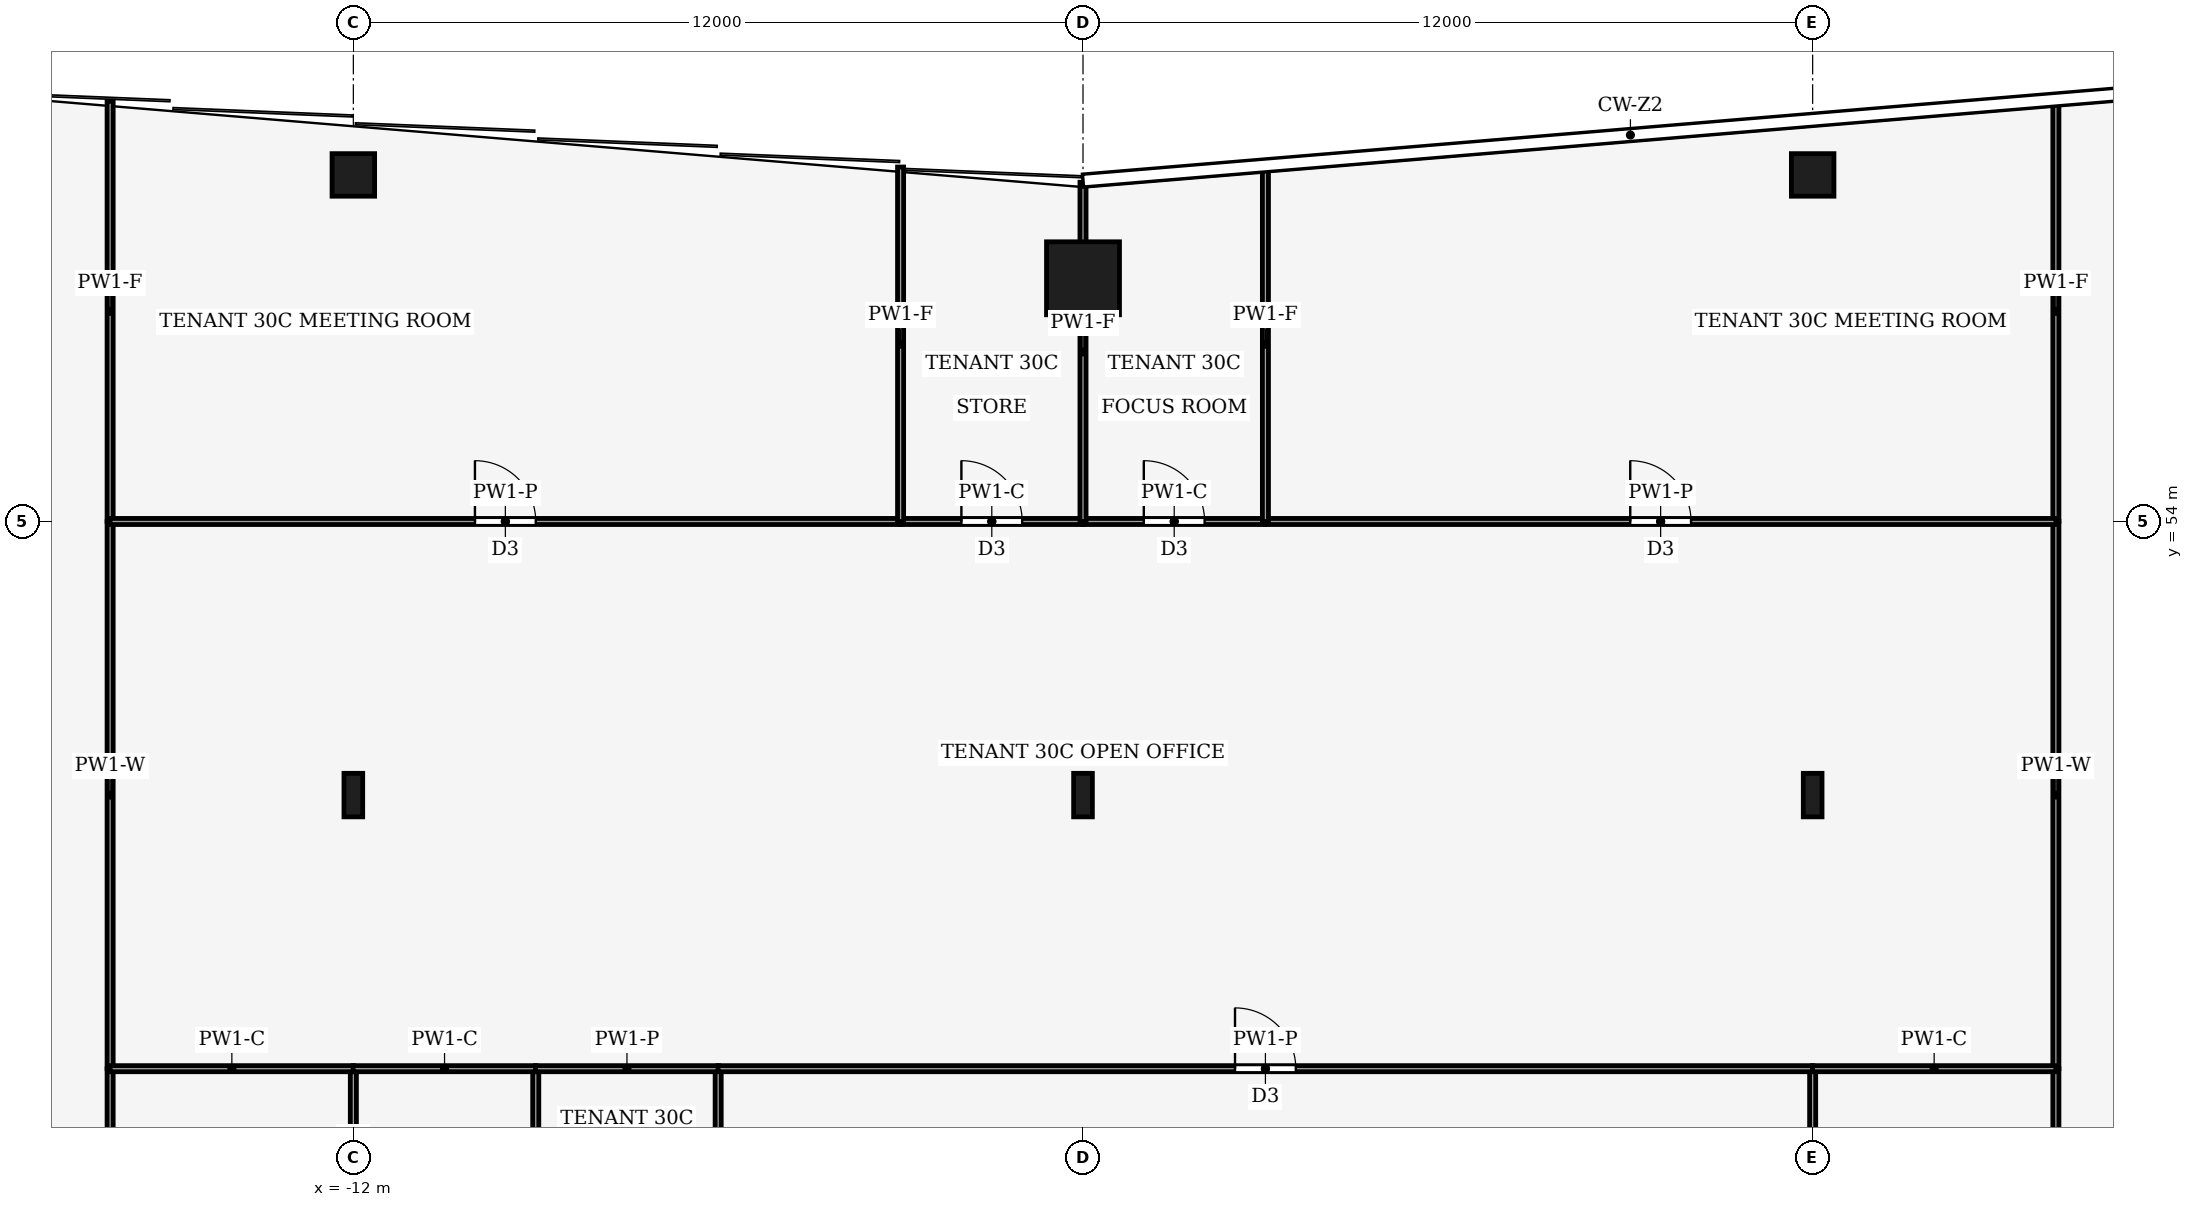
"""IFC4 building model, lengths in metres.
Left out: names, types, materials, properties, quantities, classifications, styles, units other than length and angle.
Written with IfcOpenShell. Run it as: python <this file> out.ifc"""

import sys

from ifc_helpers import new_model, si_unit, direction, frame, frame_2d, origin, origin_2d, place, context, subcontext, project, spatial, rectangle, hollow_rectangle, i_section, extrude, element, fill, save


model = new_model("IFC4")
c1 = context("Model", 3, precision=1e-05, world=origin(), true_north=direction((0.0, 1.0)))
c2 = subcontext(c1, "Body", "Model", "MODEL_VIEW")
j1 = project(units=[si_unit("LENGTHUNIT", "METRE"), si_unit("PLANEANGLEUNIT", "RADIAN")], contexts=[c1])
p1 = place(None, origin())
s1 = spatial("IfcSite", under=j1, at=p1, CompositionType="ELEMENT")
p2 = place(p1, origin())
s2 = spatial("IfcBuilding", under=s1, at=p2, CompositionType="ELEMENT")
p3 = place(p2, frame((0.0, 0.0, 134.0)))
s3 = spatial("IfcBuildingStorey", under=s2, at=p3, CompositionType="ELEMENT", Elevation=134.0)
p4 = place(p3, frame((0.0, 58.0, 0.0), z_axis=(0.0, 0.0, 1.0), x_axis=(1.0, 0.0, 0.0)))
e1 = element("IfcColumn", 1, at=p4, inside=s3, PredefinedType="COLUMN", context=c2, shape_type="SweptSolid", body=[
    extrude(hollow_rectangle(XDim=1.2, YDim=1.2, WallThickness=0.07, at=origin_2d()), origin(), (0.0, 0.0, 1.0), 4.0),
])
for number, where, z_axis, x_axis in (
    (2, (-12.0, 59.7, 0.0), (0.0, 0.0, 1.0), (1.0, 0.0, 0.0)),
    (3, (12.0, 59.7, 0.0), (0.0, 0.0, 1.0), (1.0, 0.0, 0.0)),
):
    element("IfcColumn", number, at=place(p3, frame(where, z_axis=z_axis, x_axis=x_axis)), inside=s3, PredefinedType="COLUMN", context=c2, shape_type="SweptSolid", body=[
        extrude(hollow_rectangle(XDim=0.7, YDim=0.7, WallThickness=0.03, at=origin_2d()), origin(), (0.0, 0.0, 1.0), 4.0),
    ])
for number, where, z_axis, x_axis in (
    (4, (-12.0, 49.5, 0.0), (0.0, 0.0, 1.0), (1.0, 0.0, 0.0)),
    (5, (0.0, 49.5, 0.0), (0.0, 0.0, 1.0), (1.0, 0.0, 0.0)),
    (6, (12.0, 49.5, 0.0), (0.0, 0.0, 1.0), (1.0, 0.0, 0.0)),
):
    element("IfcColumn", number, at=place(p3, frame(where, z_axis=z_axis, x_axis=x_axis)), inside=s3, PredefinedType="COLUMN", context=c2, shape_type="SweptSolid", body=[
        extrude(i_section(OverallWidth=0.308, OverallDepth=0.716, WebThickness=0.021, FlangeThickness=0.04, FilletRadius=0.027, at=origin_2d()), origin(), (0.0, 0.0, 1.0), 4.0),
    ])
p5 = place(p3, frame((-16.0, 41.0, 0.0), z_axis=(0.0, 0.0, 1.0), x_axis=(0.0, 1.0, 0.0)))
e7 = element("IfcWall", 7, at=p5, inside=s3, PredefinedType="PARTITIONING", context=c2, shape_type="SweptSolid", body=[
    extrude(rectangle(XDim=4.0, YDim=0.1, at=frame_2d((2.0, 0.0))), origin(), (0.0, 0.0, 1.0), 3.44),
])
p6 = place(p3, frame((-16.0, 45.0, 0.0), z_axis=(0.0, 0.0, 1.0), x_axis=(0.0, 1.0, 0.0)))
e8 = element("IfcWall", 8, at=p6, inside=s3, PredefinedType="PARTITIONING", context=c2, shape_type="SweptSolid", body=[
    extrude(rectangle(XDim=9.0, YDim=0.1, at=frame_2d((4.5, 0.0))), origin(), (0.0, 0.0, 1.0), 3.24),
])
p7 = place(p3, frame((-16.0, 54.0, 0.0), z_axis=(0.0, 0.0, 1.0), x_axis=(0.0, 1.0, 0.0)))
e9 = element("IfcWall", 9, at=p7, inside=s3, PredefinedType="PARTITIONING", context=c2, shape_type="SweptSolid", body=[
    extrude(rectangle(XDim=6.913, YDim=0.1, at=frame_2d((3.457, 0.0))), origin(), (0.0, 0.0, 1.0), 3.04),
])
p8 = place(p3, frame((16.0, 45.0, 0.0), z_axis=(0.0, 0.0, 1.0), x_axis=(0.0, -1.0, 0.0)))
e10 = element("IfcWall", 10, at=p8, inside=s3, PredefinedType="PARTITIONING", context=c2, shape_type="SweptSolid", body=[
    extrude(rectangle(XDim=4.0, YDim=0.1, at=frame_2d((2.0, 0.0))), origin(), (0.0, 0.0, 1.0), 3.44),
])
p9 = place(p3, frame((16.0, 54.0, 0.0), z_axis=(0.0, 0.0, 1.0), x_axis=(0.0, -1.0, 0.0)))
e11 = element("IfcWall", 11, at=p9, inside=s3, PredefinedType="PARTITIONING", context=c2, shape_type="SweptSolid", body=[
    extrude(rectangle(XDim=9.0, YDim=0.1, at=frame_2d((4.5, 0.0))), origin(), (0.0, 0.0, 1.0), 3.24),
])
p10 = place(p3, frame((16.0, 60.913, 0.0), z_axis=(0.0, 0.0, 1.0), x_axis=(0.0, -1.0, 0.0)))
e12 = element("IfcWall", 12, at=p10, inside=s3, PredefinedType="PARTITIONING", context=c2, shape_type="SweptSolid", body=[
    extrude(rectangle(XDim=6.913, YDim=0.1, at=frame_2d((3.457, 0.0))), origin(), (0.0, 0.0, 1.0), 3.04),
])
p11 = place(p3, frame((-12.0, 45.0, 0.0), z_axis=(0.0, 0.0, 1.0), x_axis=(0.0, -1.0, 0.0)))
e13 = element("IfcWall", 13, at=p11, inside=s3, PredefinedType="PARTITIONING", context=c2, shape_type="SweptSolid", body=[
    extrude(rectangle(XDim=4.0, YDim=0.1, at=frame_2d((2.0, 0.0))), origin(), (0.0, 0.0, 1.0), 3.44),
])
p12 = place(p11, frame((1.1, 0.0, 0.0)))
e14 = element("IfcOpeningElement", 14, at=p12, cuts=e13, PredefinedType="OPENING", context=c2, shape_type="SweptSolid", body=[
    extrude(rectangle(XDim=1.0, YDim=2.1, at=frame_2d((0.5, 1.05))), frame((0.0, 0.06, 0.0), z_axis=(0.0, -1.0, 0.0), x_axis=(1.0, 0.0, 0.0)), (0.0, 0.0, 1.0), 0.12),
])
p13 = place(p3, frame((-11.996, 45.0, 0.0), z_axis=(0.0, 0.0, 1.0), x_axis=(-1.0, 0.0, 0.0)))
e15 = element("IfcWall", 15, at=p13, inside=s3, PredefinedType="PARTITIONING", context=c2, shape_type="SweptSolid", body=[
    extrude(rectangle(XDim=4.004, YDim=0.1, at=frame_2d((2.002, 0.0))), origin(), (0.0, 0.0, 1.0), 3.87),
])
p14 = place(p3, frame((-9.0, 41.0, 0.0), z_axis=(0.0, 0.0, 1.0), x_axis=(0.0, 1.0, 0.0)))
e16 = element("IfcWall", 16, at=p14, inside=s3, PredefinedType="PARTITIONING", context=c2, shape_type="SweptSolid", body=[
    extrude(rectangle(XDim=4.0, YDim=0.1, at=frame_2d((2.0, 0.0))), origin(), (0.0, 0.0, 1.0), 3.87),
])
p15 = place(p3, frame((-8.996, 45.0, 0.0), z_axis=(0.0, 0.0, 1.0), x_axis=(-1.0, 0.0, 0.0)))
e17 = element("IfcWall", 17, at=p15, inside=s3, PredefinedType="PARTITIONING", context=c2, shape_type="SweptSolid", body=[
    extrude(rectangle(XDim=3.008, YDim=0.1, at=frame_2d((1.504, 0.0))), origin(), (0.0, 0.0, 1.0), 3.87),
])
p16 = place(p3, frame((-6.0, 41.0, 0.0), z_axis=(0.0, 0.0, 1.0), x_axis=(0.0, 1.0, 0.0)))
e18 = element("IfcWall", 18, at=p16, inside=s3, PredefinedType="PARTITIONING", context=c2, shape_type="SweptSolid", body=[
    extrude(rectangle(XDim=4.0, YDim=0.1, at=frame_2d((2.0, 0.0))), origin(), (0.0, 0.0, 1.0), 3.87),
])
p17 = place(p16, frame((1.5, 0.0, 0.0)))
e19 = element("IfcOpeningElement", 19, at=p17, cuts=e18, PredefinedType="OPENING", context=c2, shape_type="SweptSolid", body=[
    extrude(rectangle(XDim=1.0, YDim=2.1, at=frame_2d((0.5, 1.05))), frame((0.0, 0.06, 0.0), z_axis=(0.0, -1.0, 0.0), x_axis=(1.0, 0.0, 0.0)), (0.0, 0.0, 1.0), 0.12),
])
p18 = place(p3, frame((-5.996, 45.0, 0.0), z_axis=(0.0, 0.0, 1.0), x_axis=(-1.0, 0.0, 0.0)))
e20 = element("IfcWall", 20, at=p18, inside=s3, PredefinedType="PARTITIONING", context=c2, shape_type="SweptSolid", body=[
    extrude(rectangle(XDim=3.008, YDim=0.1, at=frame_2d((1.504, 0.0))), origin(), (0.0, 0.0, 1.0), 3.44),
])
p19 = place(p3, frame((12.0, 41.0, 0.0), z_axis=(0.0, 0.0, 1.0), x_axis=(0.0, 1.0, 0.0)))
e21 = element("IfcWall", 21, at=p19, inside=s3, PredefinedType="PARTITIONING", context=c2, shape_type="SweptSolid", body=[
    extrude(rectangle(XDim=4.0, YDim=0.1, at=frame_2d((2.0, 0.0))), origin(), (0.0, 0.0, 1.0), 3.44),
])
p20 = place(p3, frame((-6.004, 45.0, 0.0), z_axis=(0.0, 0.0, 1.0), x_axis=(1.0, 0.0, 0.0)))
e22 = element("IfcWall", 22, at=p20, inside=s3, PredefinedType="PARTITIONING", context=c2, shape_type="SweptSolid", body=[
    extrude(rectangle(XDim=18.008, YDim=0.1, at=frame_2d((9.004, 0.0))), origin(), (0.0, 0.0, 1.0), 3.44),
])
p21 = place(p20, frame((8.504, 0.0, 0.0)))
e23 = element("IfcOpeningElement", 23, at=p21, cuts=e22, PredefinedType="OPENING", context=c2, shape_type="SweptSolid", body=[
    extrude(rectangle(XDim=1.0, YDim=2.1, at=frame_2d((0.5, 1.05))), frame((0.0, 0.06, 0.0), z_axis=(0.0, -1.0, 0.0), x_axis=(1.0, 0.0, 0.0)), (0.0, 0.0, 1.0), 0.12),
])
p22 = place(p3, frame((16.0, 45.0, 0.0), z_axis=(0.0, 0.0, 1.0), x_axis=(-1.0, 0.0, 0.0)))
e24 = element("IfcWall", 24, at=p22, inside=s3, PredefinedType="PARTITIONING", context=c2, shape_type="SweptSolid", body=[
    extrude(rectangle(XDim=4.004, YDim=0.1, at=frame_2d((2.002, 0.0))), origin(), (0.0, 0.0, 1.0), 3.87),
])
p23 = place(p3, frame((-16.0, 54.0, 0.0), z_axis=(0.0, 0.0, 1.0), x_axis=(1.0, 0.0, 0.0)))
e25 = element("IfcWall", 25, at=p23, inside=s3, PredefinedType="PARTITIONING", context=c2, shape_type="SweptSolid", body=[
    extrude(rectangle(XDim=13.0, YDim=0.1, at=frame_2d((6.5, 0.0))), origin(), (0.0, 0.0, 1.0), 3.44),
])
p24 = place(p23, frame((6.0, 0.0, 0.0)))
e26 = element("IfcOpeningElement", 26, at=p24, cuts=e25, PredefinedType="OPENING", context=c2, shape_type="SweptSolid", body=[
    extrude(rectangle(XDim=1.0, YDim=2.1, at=frame_2d((0.5, 1.05))), frame((0.0, 0.06, 0.0), z_axis=(0.0, -1.0, 0.0), x_axis=(1.0, 0.0, 0.0)), (0.0, 0.0, 1.0), 0.12),
])
p25 = place(p3, frame((-3.0, 54.0, 0.0), z_axis=(0.0, 0.0, 1.0), x_axis=(1.0, 0.0, 0.0)))
e27 = element("IfcWall", 27, at=p25, inside=s3, PredefinedType="PARTITIONING", context=c2, shape_type="SweptSolid", body=[
    extrude(rectangle(XDim=3.0, YDim=0.1, at=frame_2d((1.5, 0.0))), origin(), (0.0, 0.0, 1.0), 3.87),
])
p26 = place(p25, frame((1.0, 0.0, 0.0)))
e28 = element("IfcOpeningElement", 28, at=p26, cuts=e27, PredefinedType="OPENING", context=c2, shape_type="SweptSolid", body=[
    extrude(rectangle(XDim=1.0, YDim=2.1, at=frame_2d((0.5, 1.05))), frame((0.0, 0.06, 0.0), z_axis=(0.0, -1.0, 0.0), x_axis=(1.0, 0.0, 0.0)), (0.0, 0.0, 1.0), 0.12),
])
p27 = place(p3, frame((0.0, 54.0, 0.0), z_axis=(0.0, 0.0, 1.0), x_axis=(1.0, 0.0, 0.0)))
e29 = element("IfcWall", 29, at=p27, inside=s3, PredefinedType="PARTITIONING", context=c2, shape_type="SweptSolid", body=[
    extrude(rectangle(XDim=3.0, YDim=0.1, at=frame_2d((1.5, 0.0))), origin(), (0.0, 0.0, 1.0), 3.87),
])
p28 = place(p27, frame((1.0, 0.0, 0.0)))
e30 = element("IfcOpeningElement", 30, at=p28, cuts=e29, PredefinedType="OPENING", context=c2, shape_type="SweptSolid", body=[
    extrude(rectangle(XDim=1.0, YDim=2.1, at=frame_2d((0.5, 1.05))), frame((0.0, 0.06, 0.0), z_axis=(0.0, -1.0, 0.0), x_axis=(1.0, 0.0, 0.0)), (0.0, 0.0, 1.0), 0.12),
])
p29 = place(p3, frame((3.0, 54.0, 0.0), z_axis=(0.0, 0.0, 1.0), x_axis=(1.0, 0.0, 0.0)))
e31 = element("IfcWall", 31, at=p29, inside=s3, PredefinedType="PARTITIONING", context=c2, shape_type="SweptSolid", body=[
    extrude(rectangle(XDim=13.0, YDim=0.1, at=frame_2d((6.5, 0.0))), origin(), (0.0, 0.0, 1.0), 3.44),
])
p30 = place(p29, frame((6.0, 0.0, 0.0)))
e32 = element("IfcOpeningElement", 32, at=p30, cuts=e31, PredefinedType="OPENING", context=c2, shape_type="SweptSolid", body=[
    extrude(rectangle(XDim=1.0, YDim=2.1, at=frame_2d((0.5, 1.05))), frame((0.0, 0.06, 0.0), z_axis=(0.0, -1.0, 0.0), x_axis=(1.0, 0.0, 0.0)), (0.0, 0.0, 1.0), 0.12),
])
p31 = place(p3, frame((-3.0, 54.0, 0.0), z_axis=(0.0, 0.0, 1.0), x_axis=(0.0, 1.0, 0.0)))
e33 = element("IfcWall", 33, at=p31, inside=s3, PredefinedType="PARTITIONING", context=c2, shape_type="SweptSolid", body=[
    extrude(rectangle(XDim=5.83, YDim=0.1, at=frame_2d((2.915, 0.0))), origin(), (0.0, 0.0, 1.0), 3.04),
])
p32 = place(p3, frame((0.0, 54.0, 0.0), z_axis=(0.0, 0.0, 1.0), x_axis=(0.0, 1.0, 0.0)))
e34 = element("IfcWall", 34, at=p32, inside=s3, PredefinedType="PARTITIONING", context=c2, shape_type="SweptSolid", body=[
    extrude(rectangle(XDim=5.58, YDim=0.1, at=frame_2d((2.79, 0.0))), origin(), (0.0, 0.0, 1.0), 3.04),
])
p33 = place(p3, frame((3.0, 54.0, 0.0), z_axis=(0.0, 0.0, 1.0), x_axis=(0.0, 1.0, 0.0)))
e35 = element("IfcWall", 35, at=p33, inside=s3, PredefinedType="PARTITIONING", context=c2, shape_type="SweptSolid", body=[
    extrude(rectangle(XDim=5.83, YDim=0.1, at=frame_2d((2.915, 0.0))), origin(), (0.0, 0.0, 1.0), 3.04),
])
p34 = place(p21, origin())
e36 = element("IfcDoor", 36, at=p34, inside=s3, OperationType="SINGLE_SWING_LEFT", PredefinedType="DOOR", context=c2, shape_type="SweptSolid", body=[
    extrude(rectangle(XDim=1.0, YDim=2.1, at=frame_2d((0.5, 1.05))), frame((0.0, 0.025, 0.0), z_axis=(0.0, -1.0, 0.0), x_axis=(1.0, 0.0, 0.0)), (0.0, 0.0, 1.0), 0.05),
])
fill(e23, e36)
p35 = place(p24, origin())
e37 = element("IfcDoor", 37, at=p35, inside=s3, OperationType="SINGLE_SWING_RIGHT", PredefinedType="DOOR", context=c2, shape_type="SweptSolid", body=[
    extrude(rectangle(XDim=1.0, YDim=2.1, at=frame_2d((0.5, 1.05))), frame((0.0, 0.025, 0.0), z_axis=(0.0, -1.0, 0.0), x_axis=(1.0, 0.0, 0.0)), (0.0, 0.0, 1.0), 0.05),
])
fill(e26, e37)
p36 = place(p26, origin())
e38 = element("IfcDoor", 38, at=p36, inside=s3, OperationType="SINGLE_SWING_LEFT", PredefinedType="DOOR", context=c2, shape_type="SweptSolid", body=[
    extrude(rectangle(XDim=1.0, YDim=2.1, at=frame_2d((0.5, 1.05))), frame((0.0, 0.025, 0.0), z_axis=(0.0, -1.0, 0.0), x_axis=(1.0, 0.0, 0.0)), (0.0, 0.0, 1.0), 0.05),
])
fill(e28, e38)
p37 = place(p28, origin())
e39 = element("IfcDoor", 39, at=p37, inside=s3, OperationType="SINGLE_SWING_RIGHT", PredefinedType="DOOR", context=c2, shape_type="SweptSolid", body=[
    extrude(rectangle(XDim=1.0, YDim=2.1, at=frame_2d((0.5, 1.05))), frame((0.0, 0.025, 0.0), z_axis=(0.0, -1.0, 0.0), x_axis=(1.0, 0.0, 0.0)), (0.0, 0.0, 1.0), 0.05),
])
fill(e30, e39)
p38 = place(p30, origin())
e40 = element("IfcDoor", 40, at=p38, inside=s3, OperationType="SINGLE_SWING_LEFT", PredefinedType="DOOR", context=c2, shape_type="SweptSolid", body=[
    extrude(rectangle(XDim=1.0, YDim=2.1, at=frame_2d((0.5, 1.05))), frame((0.0, 0.025, 0.0), z_axis=(0.0, -1.0, 0.0), x_axis=(1.0, 0.0, 0.0)), (0.0, 0.0, 1.0), 0.05),
])
fill(e32, e40)
save(model, sys.argv[1])
